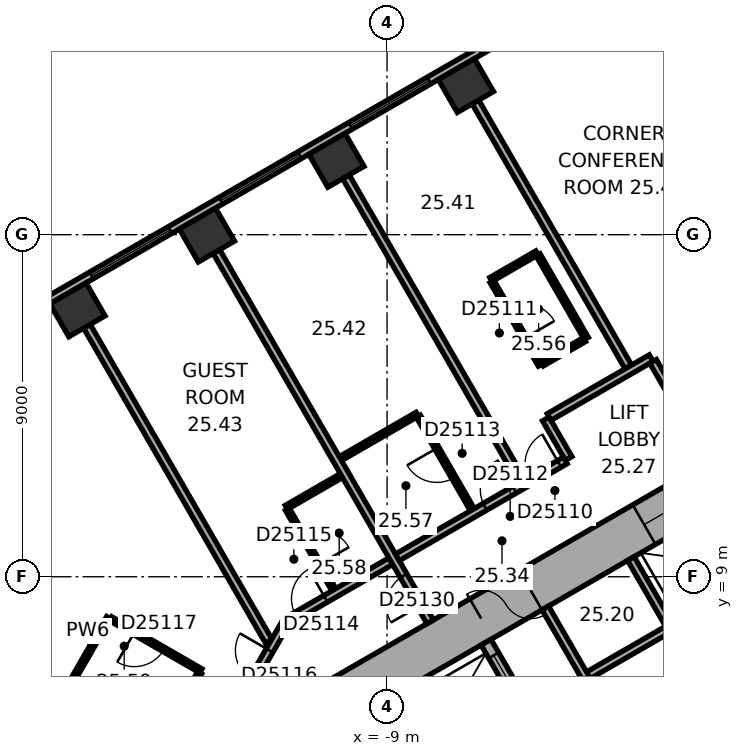
"""IFC4 building model, lengths in metres.
Left out: names, types, materials, properties, quantities, classifications, styles, units other than length and angle.
Written with IfcOpenShell. Run it as: python <this file> out.ifc"""

import sys

from ifc_helpers import new_model, si_unit, direction, frame, frame_2d, origin, origin_2d, place, context, subcontext, project, spatial, rectangle, extrude, element, fill, save


model = new_model("IFC4")
c1 = context("Model", 3, precision=1e-05, world=origin(), true_north=direction((0.0, 1.0)))
c2 = subcontext(c1, "Body", "Model", "MODEL_VIEW")
j1 = project(units=[si_unit("LENGTHUNIT", "METRE"), si_unit("PLANEANGLEUNIT", "RADIAN")], contexts=[c1])
p1 = place(None, origin())
s1 = spatial("IfcSite", under=j1, at=p1, CompositionType="ELEMENT")
p2 = place(p1, origin())
s2 = spatial("IfcBuilding", under=s1, at=p2, CompositionType="ELEMENT")
p3 = place(p2, frame((0.0, 0.0, 106.7)))
s3 = spatial("IfcBuildingStorey", under=s2, at=p3, CompositionType="ELEMENT", Elevation=106.7)
for number, where, z_axis, x_axis in (
    (1, (-6.926, 21.925, 0.0), (0.0, 0.0, 1.0), (-0.866, -0.5, 0.0)),
    (2, (-10.333, 19.957, 0.0), (0.0, 0.0, 1.0), (-0.866, -0.5, 0.0)),
    (3, (-13.74, 17.99, 0.0), (0.0, 0.0, 1.0), (-0.866, -0.5, 0.0)),
    (4, (-17.148, 16.023, 0.0), (0.0, 0.0, 1.0), (-0.866, -0.5, 0.0)),
):
    element("IfcColumn", number, at=place(p3, frame(where, z_axis=z_axis, x_axis=x_axis)), inside=s3, PredefinedType="COLUMN", context=c2, shape_type="SweptSolid", body=[
        extrude(rectangle(XDim=1.1, YDim=1.0, at=origin_2d()), origin(), (0.0, 0.0, 1.0), 3.3),
    ])
p4 = place(p3, frame((0.3, 11.836, 0.0), z_axis=(0.0, 0.0, 1.0), x_axis=(-0.866021384402, -0.500006961711, 0.0)))
e5 = element("IfcWall", 5, at=p4, inside=s3, PredefinedType="SHEAR", context=c2, shape_type="SweptSolid", body=[
    extrude(rectangle(XDim=12.355, YDim=1.2, at=frame_2d((6.178, 0.0))), origin(), (0.0, 0.0, 1.0), 3.3),
])
p5 = place(p4, frame((6.378, 0.0, 0.0)))
e6 = element("IfcOpeningElement", 6, at=p5, cuts=e5, PredefinedType="OPENING", context=c2, shape_type="SweptSolid", body=[
    extrude(rectangle(XDim=1.5, YDim=2.1, at=frame_2d((0.75, 1.05))), frame((0.0, 0.61, 0.0), z_axis=(0.0, -1.0, 0.0), x_axis=(1.0, 0.0, 0.0)), (0.0, 0.0, 1.0), 1.22),
])
p6 = place(p4, frame((1.828, 0.0, 0.0)))
e7 = element("IfcOpeningElement", 7, at=p6, cuts=e5, PredefinedType="OPENING", context=c2, shape_type="SweptSolid", body=[
    extrude(rectangle(XDim=1.1, YDim=2.1, at=frame_2d((0.55, 1.05))), frame((0.0, 0.61, 0.0), z_axis=(0.0, -1.0, 0.0), x_axis=(1.0, 0.0, 0.0)), (0.0, 0.0, 1.0), 1.22),
])
p7 = place(p3, frame((-3.136, 24.805, 0.0), z_axis=(0.0, 0.0, 1.0), x_axis=(-0.866028291626, -0.499994998079, 0.0)))
e8 = element("IfcWall", 8, at=p7, inside=s3, PredefinedType="STANDARD", context=c2, shape_type="SweptSolid", body=[
    extrude(rectangle(XDim=21.246, YDim=0.2, at=frame_2d((10.623, 0.0))), origin(), (0.0, 0.0, 1.0), 3.3),
])
p8 = place(p7, frame((1.555, 0.0, 0.8)))
e9 = element("IfcOpeningElement", 9, at=p8, cuts=e8, PredefinedType="OPENING", context=c2, shape_type="SweptSolid", body=[
    extrude(rectangle(XDim=2.4, YDim=1.7, at=frame_2d((1.2, 0.85))), frame((0.0, 0.11, 0.0), z_axis=(0.0, -1.0, 0.0), x_axis=(1.0, 0.0, 0.0)), (0.0, 0.0, 1.0), 0.22),
])
p9 = place(p7, frame((5.489, 0.0, 0.8)))
e10 = element("IfcOpeningElement", 10, at=p9, cuts=e8, PredefinedType="OPENING", context=c2, shape_type="SweptSolid", body=[
    extrude(rectangle(XDim=2.4, YDim=1.7, at=frame_2d((1.2, 0.85))), frame((0.0, 0.11, 0.0), z_axis=(0.0, -1.0, 0.0), x_axis=(1.0, 0.0, 0.0)), (0.0, 0.0, 1.0), 0.22),
])
p10 = place(p7, frame((9.424, 0.0, 0.8)))
e11 = element("IfcOpeningElement", 11, at=p10, cuts=e8, PredefinedType="OPENING", context=c2, shape_type="SweptSolid", body=[
    extrude(rectangle(XDim=2.4, YDim=1.7, at=frame_2d((1.2, 0.85))), frame((0.0, 0.11, 0.0), z_axis=(0.0, -1.0, 0.0), x_axis=(1.0, 0.0, 0.0)), (0.0, 0.0, 1.0), 0.22),
])
p11 = place(p7, frame((13.358, 0.0, 0.8)))
e12 = element("IfcOpeningElement", 12, at=p11, cuts=e8, PredefinedType="OPENING", context=c2, shape_type="SweptSolid", body=[
    extrude(rectangle(XDim=2.4, YDim=1.7, at=frame_2d((1.2, 0.85))), frame((0.0, 0.11, 0.0), z_axis=(0.0, -1.0, 0.0), x_axis=(1.0, 0.0, 0.0)), (0.0, 0.0, 1.0), 0.22),
])
p12 = place(p7, frame((17.293, 0.0, 0.8)))
e13 = element("IfcOpeningElement", 13, at=p12, cuts=e8, PredefinedType="OPENING", context=c2, shape_type="SweptSolid", body=[
    extrude(rectangle(XDim=2.4, YDim=1.7, at=frame_2d((1.2, 0.85))), frame((0.0, 0.11, 0.0), z_axis=(0.0, -1.0, 0.0), x_axis=(1.0, 0.0, 0.0)), (0.0, 0.0, 1.0), 0.22),
])
p13 = place(p3, frame((0.803, 9.009, 0.0), z_axis=(0.0, 0.0, 1.0), x_axis=(-0.866028230842, -0.499995103361, 0.0)))
e14 = element("IfcWall", 14, at=p13, inside=s3, PredefinedType="PARTITIONING", context=c2, shape_type="SweptSolid", body=[
    extrude(rectangle(XDim=5.4, YDim=0.2, at=frame_2d((2.7, 0.0))), origin(), (0.0, 0.0, 1.0), 3.05),
])
for number, where, z_axis, x_axis in (
    (15, (-1.485, 7.572, 0.0), (0.0, 0.0, 1.0), (-0.5, 0.866, 0.0)),
    (16, (-3.737, 6.272, 0.0), (0.0, 0.0, 1.0), (-0.5, 0.866, 0.0)),
):
    element("IfcWall", number, at=place(p3, frame(where, z_axis=z_axis, x_axis=x_axis)), inside=s3, PredefinedType="PARTITIONING", context=c2, shape_type="SweptSolid", body=[
        extrude(rectangle(XDim=2.2, YDim=0.2, at=frame_2d((1.1, 0.0))), origin(), (0.0, 0.0, 1.0), 3.05),
    ])
p14 = place(p3, frame((-2.216, 4.282, 0.0), z_axis=(0.0, 0.0, 1.0), x_axis=(0.499977259774, 0.866038532462, 0.0)))
e17 = element("IfcWall", 17, at=p14, inside=s3, PredefinedType="SHEAR", context=c2, shape_type="SweptSolid", body=[
    extrude(rectangle(XDim=4.7, YDim=0.3, at=frame_2d((2.35, 0.0))), origin(), (0.0, 0.0, 1.0), 3.05),
])
p15 = place(p3, frame((-5.295, 5.372, 0.0), z_axis=(0.0, 0.0, 1.0), x_axis=(-0.500077893725, 0.86598042715, 0.0)))
e18 = element("IfcWall", 18, at=p15, inside=s3, PredefinedType="SHEAR", context=c2, shape_type="SweptSolid", body=[
    extrude(rectangle(XDim=2.2, YDim=0.3, at=frame_2d((1.1, 0.0))), origin(), (0.0, 0.0, 1.0), 3.05),
])
p16 = place(p15, frame((0.7, 0.0, 0.0)))
e19 = element("IfcOpeningElement", 19, at=p16, cuts=e18, PredefinedType="OPENING", context=c2, shape_type="SweptSolid", body=[
    extrude(rectangle(XDim=1.1, YDim=2.1, at=frame_2d((0.55, 1.05))), frame((0.0, 0.16, 0.0), z_axis=(0.0, -1.0, 0.0), x_axis=(1.0, 0.0, 0.0)), (0.0, 0.0, 1.0), 0.32),
])
p17 = place(p3, frame((-17.426, 6.019, 0.0), z_axis=(0.0, 0.0, 1.0), x_axis=(0.50002983664, 0.866008176907, 0.0)))
e20 = element("IfcWall", 20, at=p17, inside=s3, PredefinedType="PARTITIONING", context=c2, shape_type="SweptSolid", body=[
    extrude(rectangle(XDim=2.2, YDim=0.12, at=frame_2d((1.1, 0.0))), origin(), (0.0, 0.0, 1.0), 3.05),
])
p18 = place(p3, frame((-16.898, 15.59, 0.0), z_axis=(0.0, 0.0, 1.0), x_axis=(0.500023458698, -0.866011859475, 0.0)))
e21 = element("IfcWall", 21, at=p18, inside=s3, PredefinedType="PARTITIONING", context=c2, shape_type="SweptSolid", body=[
    extrude(rectangle(XDim=9.572, YDim=0.2, at=frame_2d((4.786, 0.0))), origin(), (0.0, 0.0, 1.0), 3.05),
])
p19 = place(p3, frame((-16.274, 7.895, 0.0), z_axis=(0.0, 0.0, 1.0), x_axis=(0.865997131366, -0.500048966069, 0.0)))
e22 = element("IfcWall", 22, at=p19, inside=s3, PredefinedType="PARTITIONING", context=c2, shape_type="SweptSolid", body=[
    extrude(rectangle(XDim=2.74, YDim=0.12, at=frame_2d((1.37, 0.0))), origin(), (0.0, 0.0, 1.0), 3.05),
])
p20 = place(p19, frame((0.72, 0.0, 0.0)))
e23 = element("IfcOpeningElement", 23, at=p20, cuts=e22, PredefinedType="OPENING", context=c2, shape_type="SweptSolid", body=[
    extrude(rectangle(XDim=0.9, YDim=2.1, at=frame_2d((0.45, 1.05))), frame((0.0, 0.07, 0.0), z_axis=(0.0, -1.0, 0.0), x_axis=(1.0, 0.0, 0.0)), (0.0, 0.0, 1.0), 0.14),
])
p21 = place(p3, frame((-13.931, 6.472, 0.0), z_axis=(0.0, 0.0, 1.0), x_axis=(-0.499739399214, -0.866175809448, 0.0)))
e24 = element("IfcWall", 24, at=p21, inside=s3, PredefinedType="PARTITIONING", context=c2, shape_type="SweptSolid", body=[
    extrude(rectangle(XDim=0.416, YDim=0.12, at=frame_2d((0.208, 0.0))), origin(), (0.0, 0.0, 1.0), 3.05),
])
p22 = place(p3, frame((-11.65, 7.823, 0.0), z_axis=(0.0, 0.0, 1.0), x_axis=(-0.500063520245, -0.865988727248, 0.0)))
e25 = element("IfcWall", 25, at=p22, inside=s3, PredefinedType="PARTITIONING", context=c2, shape_type="SweptSolid", body=[
    extrude(rectangle(XDim=1.9, YDim=0.2, at=frame_2d((0.95, 0.0))), origin(), (0.0, 0.0, 1.0), 3.05),
])
p23 = place(p22, frame((0.882, 0.0, 0.0)))
e26 = element("IfcOpeningElement", 26, at=p23, cuts=e25, PredefinedType="OPENING", context=c2, shape_type="SweptSolid", body=[
    extrude(rectangle(XDim=0.9, YDim=2.1, at=frame_2d((0.45, 1.05))), frame((0.0, 0.11, 0.0), z_axis=(0.0, -1.0, 0.0), x_axis=(1.0, 0.0, 0.0)), (0.0, 0.0, 1.0), 0.22),
])
p24 = place(p3, frame((-11.651, 10.825, 0.0), z_axis=(0.0, 0.0, 1.0), x_axis=(0.865998477143, 0.500046635412, 0.0)))
e27 = element("IfcWall", 27, at=p24, inside=s3, PredefinedType="PARTITIONING", context=c2, shape_type="SweptSolid", body=[
    extrude(rectangle(XDim=1.673, YDim=0.12, at=frame_2d((0.836, 0.0))), origin(), (0.0, 0.0, 1.0), 3.05),
])
p25 = place(p3, frame((-10.401, 8.66, 0.0), z_axis=(0.0, 0.0, 1.0), x_axis=(-0.500077547548, 0.865980627057, 0.0)))
e28 = element("IfcWall", 28, at=p25, inside=s3, PredefinedType="PARTITIONING", context=c2, shape_type="SweptSolid", body=[
    extrude(rectangle(XDim=2.44, YDim=0.12, at=frame_2d((1.22, 0.0))), origin(), (0.0, 0.0, 1.0), 3.05),
])
p26 = place(p25, frame((0.77, 0.0, 0.0)))
e29 = element("IfcOpeningElement", 29, at=p26, cuts=e28, PredefinedType="OPENING", context=c2, shape_type="SweptSolid", body=[
    extrude(rectangle(XDim=0.9, YDim=2.1, at=frame_2d((0.45, 1.05))), frame((0.0, 0.07, 0.0), z_axis=(0.0, -1.0, 0.0), x_axis=(1.0, 0.0, 0.0)), (0.0, 0.0, 1.0), 0.14),
])
p27 = place(p3, frame((-10.229, 12.108, 0.0), z_axis=(0.0, 0.0, 1.0), x_axis=(0.866053246676, 0.499951771596, 0.0)))
e30 = element("IfcWall", 30, at=p27, inside=s3, PredefinedType="PARTITIONING", context=c2, shape_type="SweptSolid", body=[
    extrude(rectangle(XDim=2.335, YDim=0.12, at=frame_2d((1.167, 0.0))), origin(), (0.0, 0.0, 1.0), 3.05),
])
p28 = place(p3, frame((-10.083, 19.524, 0.0), z_axis=(0.0, 0.0, 1.0), x_axis=(0.499999662836, -0.866025598446, 0.0)))
e31 = element("IfcWall", 31, at=p28, inside=s3, PredefinedType="PARTITIONING", context=c2, shape_type="SweptSolid", body=[
    extrude(rectangle(XDim=9.25, YDim=0.2, at=frame_2d((4.625, 0.0))), origin(), (0.0, 0.0, 1.0), 2.6),
])
p29 = place(p3, frame((-8.902, 9.41, 0.0), z_axis=(0.0, 0.0, 1.0), x_axis=(-0.866014299198, -0.500019233215, 0.0)))
e32 = element("IfcWall", 32, at=p29, inside=s3, PredefinedType="PARTITIONING", context=c2, shape_type="SweptSolid", body=[
    extrude(rectangle(XDim=3.133, YDim=0.2, at=frame_2d((1.567, 0.0))), origin(), (0.0, 0.0, 1.0), 3.05),
])
p30 = place(p29, frame((1.978, 0.0, 0.0)))
e33 = element("IfcOpeningElement", 33, at=p30, cuts=e32, PredefinedType="OPENING", context=c2, shape_type="SweptSolid", body=[
    extrude(rectangle(XDim=0.9, YDim=2.1, at=frame_2d((0.45, 1.05))), frame((0.0, 0.11, 0.0), z_axis=(0.0, -1.0, 0.0), x_axis=(1.0, 0.0, 0.0)), (0.0, 0.0, 1.0), 0.22),
])
p31 = place(p3, frame((-8.177, 13.223, 0.0), z_axis=(0.0, 0.0, 1.0), x_axis=(0.500087089641, -0.865975116718, 0.0)))
e34 = element("IfcWall", 34, at=p31, inside=s3, PredefinedType="PARTITIONING", context=c2, shape_type="SweptSolid", body=[
    extrude(rectangle(XDim=2.84, YDim=0.12, at=frame_2d((1.42, 0.0))), origin(), (0.0, 0.0, 1.0), 3.05),
])
p32 = place(p31, frame((0.97, 0.0, 0.0)))
e35 = element("IfcOpeningElement", 35, at=p32, cuts=e34, PredefinedType="OPENING", context=c2, shape_type="SweptSolid", body=[
    extrude(rectangle(XDim=0.9, YDim=2.1, at=frame_2d((0.45, 1.05))), frame((0.0, 0.07, 0.0), z_axis=(0.0, -1.0, 0.0), x_axis=(1.0, 0.0, 0.0)), (0.0, 0.0, 1.0), 0.14),
])
p33 = place(p3, frame((-7.865, 7.814, 0.0), z_axis=(0.0, 0.0, 1.0), x_axis=(-0.500004234368, 0.866022959057, 0.0)))
e36 = element("IfcWall", 36, at=p33, inside=s3, PredefinedType="PARTITIONING", context=c2, shape_type="SweptSolid", body=[
    extrude(rectangle(XDim=11.25, YDim=0.2, at=frame_2d((5.625, 0.0))), origin(), (0.0, 0.0, 1.0), 3.05),
])
p34 = place(p33, frame((0.5, 0.0, 0.0)))
e37 = element("IfcOpeningElement", 37, at=p34, cuts=e36, PredefinedType="OPENING", context=c2, shape_type="SweptSolid", body=[
    extrude(rectangle(XDim=0.9, YDim=2.1, at=frame_2d((0.45, 1.05))), frame((0.0, 0.11, 0.0), z_axis=(0.0, -1.0, 0.0), x_axis=(1.0, 0.0, 0.0)), (0.0, 0.0, 1.0), 0.22),
])
p35 = place(p3, frame((-6.676, 21.492, 0.0), z_axis=(0.0, 0.0, 1.0), x_axis=(0.500011263043, -0.866018900966, 0.0)))
e38 = element("IfcWall", 38, at=p35, inside=s3, PredefinedType="PARTITIONING", context=c2, shape_type="SweptSolid", body=[
    extrude(rectangle(XDim=8.049, YDim=0.2, at=frame_2d((4.024, 0.0))), origin(), (0.0, 0.0, 1.0), 3.05),
])
p36 = place(p3, frame((-6.268, 16.82, 0.0), z_axis=(0.0, 0.0, 1.0), x_axis=(0.866002662425, 0.500039387122, 0.0)))
e39 = element("IfcWall", 39, at=p36, inside=s3, PredefinedType="PARTITIONING", context=c2, shape_type="SweptSolid", body=[
    extrude(rectangle(XDim=1.4, YDim=0.12, at=frame_2d((0.7, 0.0))), origin(), (0.0, 0.0, 1.0), 3.05),
])
p37 = place(p3, frame((-5.026, 17.469, 0.0), z_axis=(0.0, 0.0, 1.0), x_axis=(0.500005339912, -0.866022320763, 0.0)))
e40 = element("IfcWall", 40, at=p37, inside=s3, PredefinedType="PARTITIONING", context=c2, shape_type="SweptSolid", body=[
    extrude(rectangle(XDim=2.54, YDim=0.12, at=frame_2d((1.27, 0.0))), origin(), (0.0, 0.0, 1.0), 3.05),
])
p38 = place(p3, frame((-4.968, 14.569, 0.0), z_axis=(0.0, 0.0, 1.0), x_axis=(-0.500046963369, 0.865998287773, 0.0)))
e41 = element("IfcWall", 41, at=p38, inside=s3, PredefinedType="PARTITIONING", context=c2, shape_type="SweptSolid", body=[
    extrude(rectangle(XDim=2.54, YDim=0.12, at=frame_2d((1.27, 0.0))), origin(), (0.0, 0.0, 1.0), 3.05),
])
p39 = place(p38, frame((0.82, 0.0, 0.0)))
e42 = element("IfcOpeningElement", 42, at=p39, cuts=e41, PredefinedType="OPENING", context=c2, shape_type="SweptSolid", body=[
    extrude(rectangle(XDim=0.9, YDim=2.1, at=frame_2d((0.45, 1.05))), frame((0.0, 0.07, 0.0), z_axis=(0.0, -1.0, 0.0), x_axis=(1.0, 0.0, 0.0)), (0.0, 0.0, 1.0), 0.14),
])
p40 = place(p3, frame((-4.823, 13.152, 0.0), z_axis=(0.0, 0.0, 1.0), x_axis=(0.499986357472, -0.866033280158, 0.0)))
e43 = element("IfcWall", 43, at=p40, inside=s3, PredefinedType="PARTITIONING", context=c2, shape_type="SweptSolid", body=[
    extrude(rectangle(XDim=1.201, YDim=0.2, at=frame_2d((0.601, 0.0))), origin(), (0.0, 0.0, 1.0), 3.05),
])
p41 = place(p3, frame((-4.309, 12.061, 0.0), z_axis=(0.0, 0.0, 1.0), x_axis=(-0.866020679205, -0.500008183122, 0.0)))
e44 = element("IfcWall", 44, at=p41, inside=s3, PredefinedType="PARTITIONING", context=c2, shape_type="SweptSolid", body=[
    extrude(rectangle(XDim=5.104, YDim=0.2, at=frame_2d((2.552, 0.0))), origin(), (0.0, 0.0, 1.0), 3.05),
])
p42 = place(p41, frame((0.185, 0.0, 0.0)))
e45 = element("IfcOpeningElement", 45, at=p42, cuts=e44, PredefinedType="OPENING", context=c2, shape_type="SweptSolid", body=[
    extrude(rectangle(XDim=0.9, YDim=2.1, at=frame_2d((0.45, 1.05))), frame((0.0, 0.11, 0.0), z_axis=(0.0, -1.0, 0.0), x_axis=(1.0, 0.0, 0.0)), (0.0, 0.0, 1.0), 0.22),
])
p43 = place(p41, frame((1.544, 0.0, 0.0)))
e46 = element("IfcOpeningElement", 46, at=p43, cuts=e44, PredefinedType="OPENING", context=c2, shape_type="SweptSolid", body=[
    extrude(rectangle(XDim=0.9, YDim=2.1, at=frame_2d((0.45, 1.05))), frame((0.0, 0.11, 0.0), z_axis=(0.0, -1.0, 0.0), x_axis=(1.0, 0.0, 0.0)), (0.0, 0.0, 1.0), 0.22),
])
p44 = place(p3, frame((-3.808, 15.239, 0.0), z_axis=(0.0, 0.0, 1.0), x_axis=(-0.866087136806, -0.499893060024, 0.0)))
e47 = element("IfcWall", 47, at=p44, inside=s3, PredefinedType="PARTITIONING", context=c2, shape_type="SweptSolid", body=[
    extrude(rectangle(XDim=1.28, YDim=0.12, at=frame_2d((0.64, 0.0))), origin(), (0.0, 0.0, 1.0), 3.05),
])
p45 = place(p3, frame((-2.05, 14.752, 0.0), z_axis=(0.0, 0.0, 1.0), x_axis=(-0.866030936828, -0.499990416364, 0.0)))
e48 = element("IfcWall", 48, at=p45, inside=s3, PredefinedType="PARTITIONING", context=c2, shape_type="SweptSolid", body=[
    extrude(rectangle(XDim=3.102, YDim=0.2, at=frame_2d((1.551, 0.0))), origin(), (0.0, 0.0, 1.0), 3.05),
])
p46 = place(p3, frame((-1.449, 13.712, 0.0), z_axis=(0.0, 0.0, 1.0), x_axis=(-0.499978356969, 0.866037899034, 0.0)))
e49 = element("IfcWall", 49, at=p46, inside=s3, PredefinedType="PARTITIONING", context=c2, shape_type="SweptSolid", body=[
    extrude(rectangle(XDim=1.101, YDim=0.2, at=frame_2d((0.551, 0.0))), origin(), (0.0, 0.0, 1.0), 3.05),
])
p47 = place(p9, origin())
e50 = element("IfcWindow", 50, at=p47, inside=s3, PartitioningType="SINGLE_PANEL", PredefinedType="WINDOW", context=c2, shape_type="SweptSolid", body=[
    extrude(rectangle(XDim=2.4, YDim=1.7, at=frame_2d((1.2, 0.85))), frame((0.0, 0.03, 0.0), z_axis=(0.0, -1.0, 0.0), x_axis=(1.0, 0.0, 0.0)), (0.0, 0.0, 1.0), 0.06),
])
fill(e10, e50)
p48 = place(p10, origin())
e51 = element("IfcWindow", 51, at=p48, inside=s3, PartitioningType="SINGLE_PANEL", PredefinedType="WINDOW", context=c2, shape_type="SweptSolid", body=[
    extrude(rectangle(XDim=2.4, YDim=1.7, at=frame_2d((1.2, 0.85))), frame((0.0, 0.03, 0.0), z_axis=(0.0, -1.0, 0.0), x_axis=(1.0, 0.0, 0.0)), (0.0, 0.0, 1.0), 0.06),
])
fill(e11, e51)
p49 = place(p11, origin())
e52 = element("IfcWindow", 52, at=p49, inside=s3, PartitioningType="SINGLE_PANEL", PredefinedType="WINDOW", context=c2, shape_type="SweptSolid", body=[
    extrude(rectangle(XDim=2.4, YDim=1.7, at=frame_2d((1.2, 0.85))), frame((0.0, 0.03, 0.0), z_axis=(0.0, -1.0, 0.0), x_axis=(1.0, 0.0, 0.0)), (0.0, 0.0, 1.0), 0.06),
])
fill(e12, e52)
p50 = place(p5, origin())
e53 = element("IfcDoor", 53, at=p50, inside=s3, OperationType="DOUBLE_DOOR_SINGLE_SWING", PredefinedType="DOOR", context=c2, shape_type="SweptSolid", body=[
    extrude(rectangle(XDim=1.5, YDim=2.1, at=frame_2d((0.75, 1.05))), frame((0.0, 0.025, 0.0), z_axis=(0.0, -1.0, 0.0), x_axis=(1.0, 0.0, 0.0)), (0.0, 0.0, 1.0), 0.05),
])
fill(e6, e53)
p51 = place(p16, origin())
e54 = element("IfcDoor", 54, at=p51, inside=s3, OperationType="DOUBLE_DOOR_SLIDING", PredefinedType="DOOR", context=c2, shape_type="SweptSolid", body=[
    extrude(rectangle(XDim=1.1, YDim=2.1, at=frame_2d((0.55, 1.05))), frame((0.0, 0.025, 0.0), z_axis=(0.0, -1.0, 0.0), x_axis=(1.0, 0.0, 0.0)), (0.0, 0.0, 1.0), 0.05),
])
fill(e19, e54)
p52 = place(p6, origin())
e55 = element("IfcDoor", 55, at=p52, inside=s3, OperationType="DOUBLE_DOOR_SLIDING", PredefinedType="DOOR", context=c2, shape_type="SweptSolid", body=[
    extrude(rectangle(XDim=1.1, YDim=2.1, at=frame_2d((0.55, 1.05))), frame((0.0, 0.025, 0.0), z_axis=(0.0, -1.0, 0.0), x_axis=(1.0, 0.0, 0.0)), (0.0, 0.0, 1.0), 0.05),
])
fill(e7, e55)
p53 = place(p42, origin())
e56 = element("IfcDoor", 56, at=p53, inside=s3, OperationType="SINGLE_SWING_LEFT", PredefinedType="DOOR", context=c2, shape_type="SweptSolid", body=[
    extrude(rectangle(XDim=0.9, YDim=2.1, at=frame_2d((0.45, 1.05))), frame((0.0, 0.025, 0.0), z_axis=(0.0, -1.0, 0.0), x_axis=(1.0, 0.0, 0.0)), (0.0, 0.0, 1.0), 0.05),
])
fill(e45, e56)
p54 = place(p39, origin())
e57 = element("IfcDoor", 57, at=p54, inside=s3, OperationType="SINGLE_SWING_LEFT", PredefinedType="DOOR", context=c2, shape_type="SweptSolid", body=[
    extrude(rectangle(XDim=0.9, YDim=2.1, at=frame_2d((0.45, 1.05))), frame((0.0, 0.025, 0.0), z_axis=(0.0, -1.0, 0.0), x_axis=(1.0, 0.0, 0.0)), (0.0, 0.0, 1.0), 0.05),
])
fill(e42, e57)
p55 = place(p43, origin())
e58 = element("IfcDoor", 58, at=p55, inside=s3, OperationType="SINGLE_SWING_LEFT", PredefinedType="DOOR", context=c2, shape_type="SweptSolid", body=[
    extrude(rectangle(XDim=0.9, YDim=2.1, at=frame_2d((0.45, 1.05))), frame((0.0, 0.025, 0.0), z_axis=(0.0, -1.0, 0.0), x_axis=(1.0, 0.0, 0.0)), (0.0, 0.0, 1.0), 0.05),
])
fill(e46, e58)
p56 = place(p32, origin())
e59 = element("IfcDoor", 59, at=p56, inside=s3, OperationType="SINGLE_SWING_LEFT", PredefinedType="DOOR", context=c2, shape_type="SweptSolid", body=[
    extrude(rectangle(XDim=0.9, YDim=2.1, at=frame_2d((0.45, 1.05))), frame((0.0, 0.025, 0.0), z_axis=(0.0, -1.0, 0.0), x_axis=(1.0, 0.0, 0.0)), (0.0, 0.0, 1.0), 0.05),
])
fill(e35, e59)
p57 = place(p30, origin())
e60 = element("IfcDoor", 60, at=p57, inside=s3, OperationType="SINGLE_SWING_LEFT", PredefinedType="DOOR", context=c2, shape_type="SweptSolid", body=[
    extrude(rectangle(XDim=0.9, YDim=2.1, at=frame_2d((0.45, 1.05))), frame((0.0, 0.025, 0.0), z_axis=(0.0, -1.0, 0.0), x_axis=(1.0, 0.0, 0.0)), (0.0, 0.0, 1.0), 0.05),
])
fill(e33, e60)
p58 = place(p26, origin())
e61 = element("IfcDoor", 61, at=p58, inside=s3, OperationType="SINGLE_SWING_LEFT", PredefinedType="DOOR", context=c2, shape_type="SweptSolid", body=[
    extrude(rectangle(XDim=0.9, YDim=2.1, at=frame_2d((0.45, 1.05))), frame((0.0, 0.025, 0.0), z_axis=(0.0, -1.0, 0.0), x_axis=(1.0, 0.0, 0.0)), (0.0, 0.0, 1.0), 0.05),
])
fill(e29, e61)
p59 = place(p23, origin())
e62 = element("IfcDoor", 62, at=p59, inside=s3, OperationType="SINGLE_SWING_LEFT", PredefinedType="DOOR", context=c2, shape_type="SweptSolid", body=[
    extrude(rectangle(XDim=0.9, YDim=2.1, at=frame_2d((0.45, 1.05))), frame((0.0, 0.025, 0.0), z_axis=(0.0, -1.0, 0.0), x_axis=(1.0, 0.0, 0.0)), (0.0, 0.0, 1.0), 0.05),
])
fill(e26, e62)
p60 = place(p20, origin())
e63 = element("IfcDoor", 63, at=p60, inside=s3, OperationType="SINGLE_SWING_LEFT", PredefinedType="DOOR", context=c2, shape_type="SweptSolid", body=[
    extrude(rectangle(XDim=0.9, YDim=2.1, at=frame_2d((0.45, 1.05))), frame((0.0, 0.025, 0.0), z_axis=(0.0, -1.0, 0.0), x_axis=(1.0, 0.0, 0.0)), (0.0, 0.0, 1.0), 0.05),
])
fill(e23, e63)
p61 = place(p34, origin())
e64 = element("IfcDoor", 64, at=p61, inside=s3, OperationType="SINGLE_SWING_LEFT", PredefinedType="DOOR", context=c2, shape_type="SweptSolid", body=[
    extrude(rectangle(XDim=0.9, YDim=2.1, at=frame_2d((0.45, 1.05))), frame((0.0, 0.025, 0.0), z_axis=(0.0, -1.0, 0.0), x_axis=(1.0, 0.0, 0.0)), (0.0, 0.0, 1.0), 0.05),
])
fill(e37, e64)
save(model, sys.argv[1])
